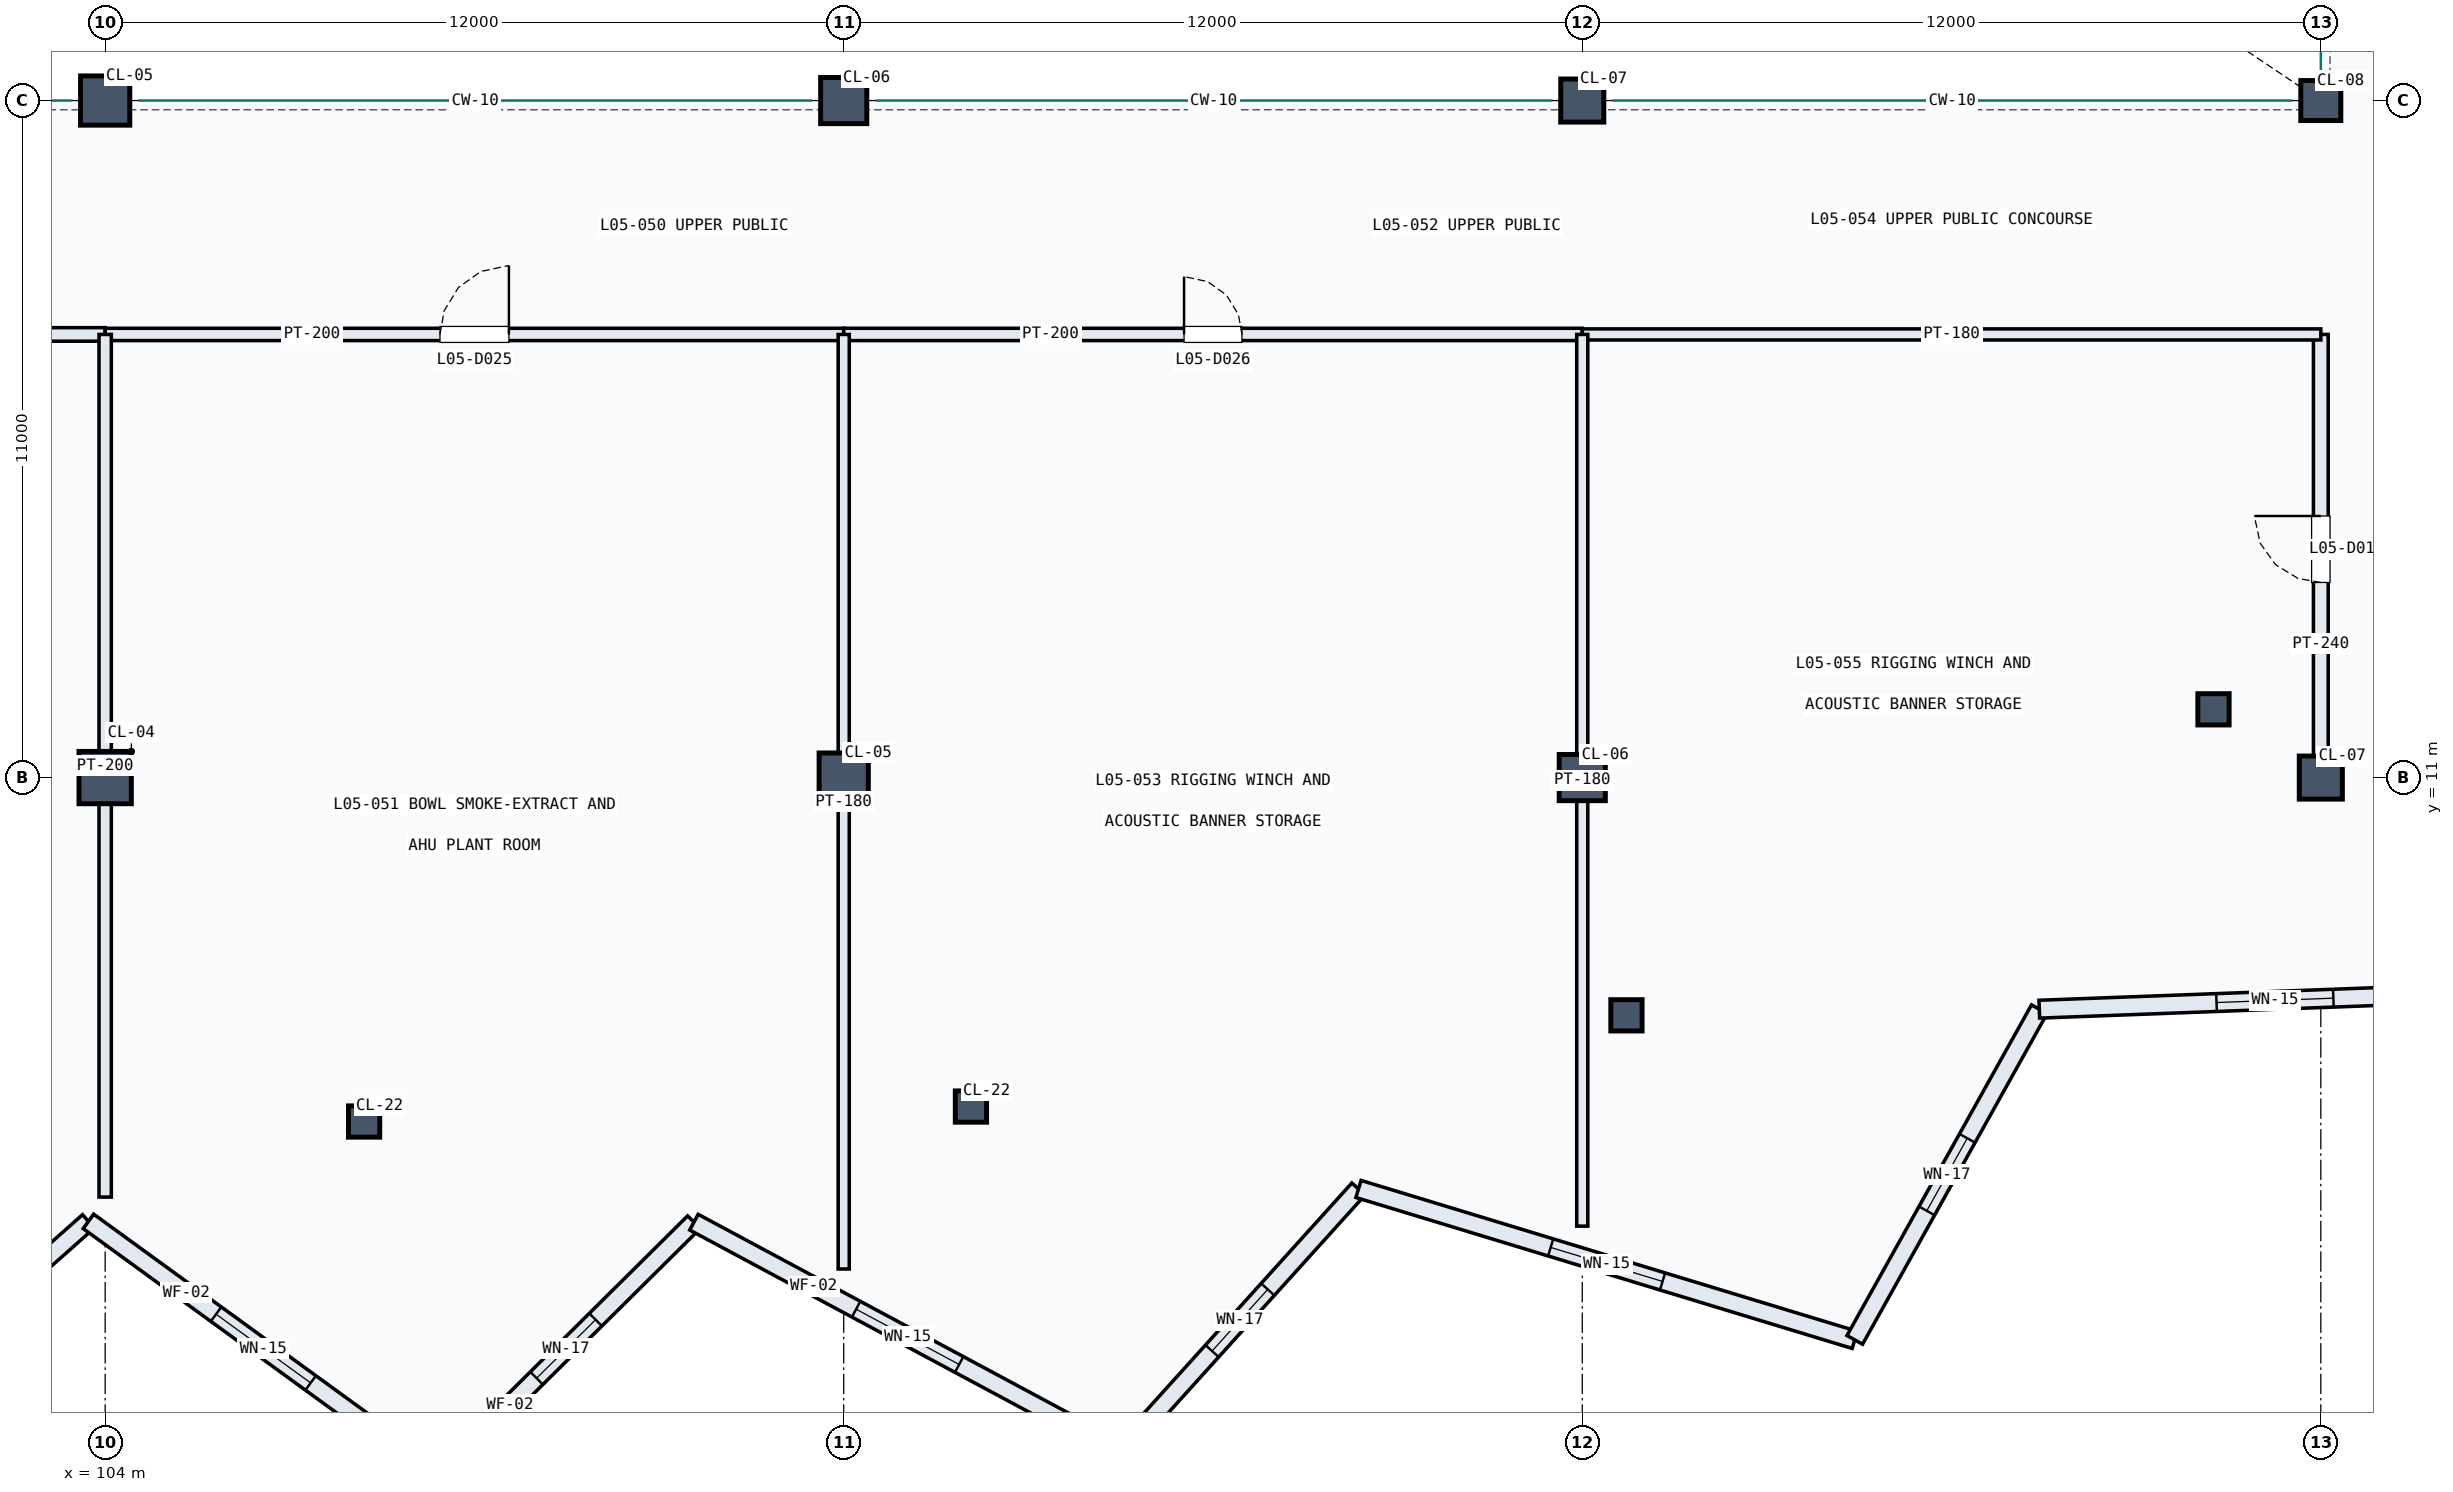
"""IFC4 building model, lengths in metres.
Left out: names, types, materials, properties, quantities, classifications, styles, units other than length and angle.
Written with IfcOpenShell. Run it as: python <this file> out.ifc"""

import sys

from ifc_helpers import new_model, si_unit, direction, frame, frame_2d, origin, origin_2d, place, context, subcontext, project, spatial, rectangle, hollow_circle, extrude, element, fill, save


model = new_model("IFC4")
c1 = context("Model", 3, precision=1e-05, world=origin(), true_north=direction((0.0, 1.0)))
c2 = subcontext(c1, "Body", "Model", "MODEL_VIEW")
j1 = project(units=[si_unit("LENGTHUNIT", "METRE"), si_unit("PLANEANGLEUNIT", "RADIAN")], contexts=[c1])
p1 = place(None, origin())
s1 = spatial("IfcSite", under=j1, at=p1, CompositionType="ELEMENT")
p2 = place(p1, origin())
s2 = spatial("IfcBuilding", under=s1, at=p2, CompositionType="ELEMENT")
p3 = place(p2, frame((0.0, 0.0, 24.3)))
s3 = spatial("IfcBuildingStorey", under=s2, at=p3, CompositionType="ELEMENT", Elevation=24.3)
p4 = place(p3, frame((104.0, 11.0, 0.0), z_axis=(0.0, 0.0, 1.0), x_axis=(1.0, 0.0, 0.0)))
e1 = element("IfcColumn", 1, at=p4, inside=s3, PredefinedType="COLUMN", context=c2, shape_type="SweptSolid", body=[
    extrude(rectangle(XDim=0.85, YDim=0.85, at=origin_2d()), origin(), (0.0, 0.0, 1.0), 5.4),
])
for number, where, z_axis, x_axis in (
    (2, (104.0, 22.0, 0.0), (0.0, 0.0, 1.0), (1.0, 0.0, 0.0)),
    (3, (116.0, 11.0, 0.0), (0.0, 0.0, 1.0), (1.0, 0.0, 0.0)),
):
    element("IfcColumn", number, at=place(p3, frame(where, z_axis=z_axis, x_axis=x_axis)), inside=s3, PredefinedType="COLUMN", context=c2, shape_type="SweptSolid", body=[
        extrude(rectangle(XDim=0.8, YDim=0.8, at=origin_2d()), origin(), (0.0, 0.0, 1.0), 5.4),
    ])
for number, where, z_axis, x_axis in (
    (4, (116.0, 22.0, 0.0), (0.0, 0.0, 1.0), (1.0, 0.0, 0.0)),
    (5, (128.0, 11.0, 0.0), (0.0, 0.0, 1.0), (1.0, 0.0, 0.0)),
):
    element("IfcColumn", number, at=place(p3, frame(where, z_axis=z_axis, x_axis=x_axis)), inside=s3, PredefinedType="COLUMN", context=c2, shape_type="SweptSolid", body=[
        extrude(rectangle(XDim=0.75, YDim=0.75, at=origin_2d()), origin(), (0.0, 0.0, 1.0), 5.4),
    ])
for number, where, z_axis, x_axis in (
    (6, (128.0, 22.0, 0.0), (0.0, 0.0, 1.0), (1.0, 0.0, 0.0)),
    (7, (140.0, 11.0, 0.0), (0.0, 0.0, 1.0), (1.0, 0.0, 0.0)),
):
    element("IfcColumn", number, at=place(p3, frame(where, z_axis=z_axis, x_axis=x_axis)), inside=s3, PredefinedType="COLUMN", context=c2, shape_type="SweptSolid", body=[
        extrude(rectangle(XDim=0.7, YDim=0.7, at=origin_2d()), origin(), (0.0, 0.0, 1.0), 5.4),
    ])
p5 = place(p3, frame((140.0, 22.0, 0.0), z_axis=(0.0, 0.0, 1.0), x_axis=(1.0, 0.0, 0.0)))
e8 = element("IfcColumn", 8, at=p5, inside=s3, PredefinedType="COLUMN", context=c2, shape_type="SweptSolid", body=[
    extrude(rectangle(XDim=0.65, YDim=0.65, at=origin_2d()), origin(), (0.0, 0.0, 1.0), 5.4),
])
for number, where, z_axis, x_axis in (
    (9, (108.207, 5.412, 0.0), (0.0, 0.0, 1.0), (1.0, 0.0, 0.0)),
    (10, (118.067, 5.655, 0.0), (0.0, 0.0, 1.0), (1.0, 0.0, 0.0)),
    (11, (128.718, 7.137, 0.0), (0.0, 0.0, 1.0), (1.0, 0.0, 0.0)),
    (12, (138.256, 12.109, 0.0), (0.0, 0.0, 1.0), (1.0, 0.0, 0.0)),
):
    element("IfcColumn", number, at=place(p3, frame(where, z_axis=z_axis, x_axis=x_axis)), inside=s3, PredefinedType="COLUMN", context=c2, shape_type="SweptSolid", body=[
        extrude(hollow_circle(Radius=0.254, WallThickness=0.02, at=origin_2d()), origin(), (0.0, 0.0, 1.0), 6.05),
    ])
p6 = place(p3, frame((99.0, -0.4, 0.0), z_axis=(0.0, 0.0, 1.0), x_axis=(0.74844895461, 0.663192402205, 0.0)))
e13 = element("IfcWall", 13, at=p6, inside=s3, PredefinedType="USERDEFINED", context=c2, shape_type="SweptSolid", body=[
    extrude(rectangle(XDim=6.317, YDim=0.29, at=frame_2d((3.159, 0.0))), origin(), (0.0, 0.0, 1.0), 4.34),
])
p7 = place(p6, frame((2.484, 0.0, 0.8)))
e14 = element("IfcOpeningElement", 14, at=p7, cuts=e13, PredefinedType="OPENING", context=c2, shape_type="SweptSolid", body=[
    extrude(rectangle(XDim=1.35, YDim=2.1, at=frame_2d((0.675, 1.05))), frame((0.0, 0.155, 0.0), z_axis=(0.0, -1.0, 0.0), x_axis=(1.0, 0.0, 0.0)), (0.0, 0.0, 1.0), 0.31),
])
p8 = place(p3, frame((103.728, 3.79, 0.0), z_axis=(0.0, 0.0, 1.0), x_axis=(0.808841233488, -0.588027090371, 0.0)))
e15 = element("IfcWall", 15, at=p8, inside=s3, PredefinedType="USERDEFINED", context=c2, shape_type="SweptSolid", body=[
    extrude(rectangle(XDim=7.027, YDim=0.29, at=frame_2d((3.514, 0.0))), origin(), (0.0, 0.0, 1.0), 4.34),
])
p9 = place(p8, frame((2.564, 0.0, 0.85)))
e16 = element("IfcOpeningElement", 16, at=p9, cuts=e15, PredefinedType="OPENING", context=c2, shape_type="SweptSolid", body=[
    extrude(rectangle(XDim=1.9, YDim=1.6, at=frame_2d((0.95, 0.8))), frame((0.0, 0.155, 0.0), z_axis=(0.0, -1.0, 0.0), x_axis=(1.0, 0.0, 0.0)), (0.0, 0.0, 1.0), 0.31),
])
p10 = place(p3, frame((109.412, -0.343, 0.0), z_axis=(0.0, 0.0, 1.0), x_axis=(0.710084208502, 0.704116763638, 0.0)))
e17 = element("IfcWall", 17, at=p10, inside=s3, PredefinedType="USERDEFINED", context=c2, shape_type="SweptSolid", body=[
    extrude(rectangle(XDim=5.85, YDim=0.29, at=frame_2d((2.925, 0.0))), origin(), (0.0, 0.0, 1.0), 4.34),
])
p11 = place(p10, frame((2.25, 0.0, 0.8)))
e18 = element("IfcOpeningElement", 18, at=p11, cuts=e17, PredefinedType="OPENING", context=c2, shape_type="SweptSolid", body=[
    extrude(rectangle(XDim=1.35, YDim=2.1, at=frame_2d((0.675, 1.05))), frame((0.0, 0.155, 0.0), z_axis=(0.0, -1.0, 0.0), x_axis=(1.0, 0.0, 0.0)), (0.0, 0.0, 1.0), 0.31),
])
p12 = place(p3, frame((113.566, 3.777, 0.0), z_axis=(0.0, 0.0, 1.0), x_axis=(0.881201188687, -0.472741435731, 0.0)))
e19 = element("IfcWall", 19, at=p12, inside=s3, PredefinedType="USERDEFINED", context=c2, shape_type="SweptSolid", body=[
    extrude(rectangle(XDim=7.881, YDim=0.29, at=frame_2d((3.94, 0.0))), origin(), (0.0, 0.0, 1.0), 4.34),
])
p13 = place(p12, frame((2.99, 0.0, 0.85)))
e20 = element("IfcOpeningElement", 20, at=p13, cuts=e19, PredefinedType="OPENING", context=c2, shape_type="SweptSolid", body=[
    extrude(rectangle(XDim=1.9, YDim=1.6, at=frame_2d((0.95, 0.8))), frame((0.0, 0.155, 0.0), z_axis=(0.0, -1.0, 0.0), x_axis=(1.0, 0.0, 0.0)), (0.0, 0.0, 1.0), 0.31),
])
p14 = place(p3, frame((120.511, 0.051, 0.0), z_axis=(0.0, 0.0, 1.0), x_axis=(0.670348131104, 0.742046752654, 0.0)))
e21 = element("IfcWall", 21, at=p14, inside=s3, PredefinedType="USERDEFINED", context=c2, shape_type="SweptSolid", body=[
    extrude(rectangle(XDim=5.748, YDim=0.29, at=frame_2d((2.874, 0.0))), origin(), (0.0, 0.0, 1.0), 4.34),
])
p15 = place(p14, frame((2.199, 0.0, 0.8)))
e22 = element("IfcOpeningElement", 22, at=p15, cuts=e21, PredefinedType="OPENING", context=c2, shape_type="SweptSolid", body=[
    extrude(rectangle(XDim=1.35, YDim=2.1, at=frame_2d((0.675, 1.05))), frame((0.0, 0.155, 0.0), z_axis=(0.0, -1.0, 0.0), x_axis=(1.0, 0.0, 0.0)), (0.0, 0.0, 1.0), 0.31),
])
p16 = place(p3, frame((124.364, 4.316, 0.0), z_axis=(0.0, 0.0, 1.0), x_axis=(0.956738407321, -0.290949514446, 0.0)))
e23 = element("IfcWall", 23, at=p16, inside=s3, PredefinedType="USERDEFINED", context=c2, shape_type="SweptSolid", body=[
    extrude(rectangle(XDim=8.428, YDim=0.29, at=frame_2d((4.214, 0.0))), origin(), (0.0, 0.0, 1.0), 4.34),
])
p17 = place(p16, frame((3.264, 0.0, 0.85)))
e24 = element("IfcOpeningElement", 24, at=p17, cuts=e23, PredefinedType="OPENING", context=c2, shape_type="SweptSolid", body=[
    extrude(rectangle(XDim=1.9, YDim=1.6, at=frame_2d((0.95, 0.8))), frame((0.0, 0.155, 0.0), z_axis=(0.0, -1.0, 0.0), x_axis=(1.0, 0.0, 0.0)), (0.0, 0.0, 1.0), 0.31),
])
p18 = place(p3, frame((132.427, 1.864, 0.0), z_axis=(0.0, 0.0, 1.0), x_axis=(0.487306352228, 0.87323108, 0.0)))
e25 = element("IfcWall", 25, at=p18, inside=s3, PredefinedType="USERDEFINED", context=c2, shape_type="SweptSolid", body=[
    extrude(rectangle(XDim=6.153, YDim=0.29, at=frame_2d((3.076, 0.0))), origin(), (0.0, 0.0, 1.0), 4.34),
])
p19 = place(p18, frame((2.402, 0.0, 0.8)))
e26 = element("IfcOpeningElement", 26, at=p19, cuts=e25, PredefinedType="OPENING", context=c2, shape_type="SweptSolid", body=[
    extrude(rectangle(XDim=1.35, YDim=2.1, at=frame_2d((0.675, 1.05))), frame((0.0, 0.155, 0.0), z_axis=(0.0, -1.0, 0.0), x_axis=(1.0, 0.0, 0.0)), (0.0, 0.0, 1.0), 0.31),
])
p20 = place(p3, frame((135.426, 7.237, 0.0), z_axis=(0.0, 0.0, 1.0), x_axis=(0.999297884119, 0.037466502319, 0.0)))
e27 = element("IfcWall", 27, at=p20, inside=s3, PredefinedType="USERDEFINED", context=c2, shape_type="SweptSolid", body=[
    extrude(rectangle(XDim=7.663, YDim=0.29, at=frame_2d((3.832, 0.0))), origin(), (0.0, 0.0, 1.0), 4.34),
])
p21 = place(p20, frame((2.882, 0.0, 0.85)))
e28 = element("IfcOpeningElement", 28, at=p21, cuts=e27, PredefinedType="OPENING", context=c2, shape_type="SweptSolid", body=[
    extrude(rectangle(XDim=1.9, YDim=1.6, at=frame_2d((0.95, 0.8))), frame((0.0, 0.155, 0.0), z_axis=(0.0, -1.0, 0.0), x_axis=(1.0, 0.0, 0.0)), (0.0, 0.0, 1.0), 0.31),
])
p22 = place(p3, frame((140.0, 11.22, 0.0), z_axis=(0.0, 0.0, 1.0), x_axis=(0.0, 1.0, 0.0)))
e29 = element("IfcWall", 29, at=p22, inside=s3, PredefinedType="PARTITIONING", context=c2, shape_type="SweptSolid", body=[
    extrude(rectangle(XDim=6.98, YDim=0.24, at=frame_2d((3.49, 0.0))), origin(), (0.0, 0.0, 1.0), 5.18),
])
p23 = place(p22, frame((2.95, 0.0, 0.0)))
e30 = element("IfcOpeningElement", 30, at=p23, cuts=e29, PredefinedType="OPENING", context=c2, shape_type="SweptSolid", body=[
    extrude(rectangle(XDim=1.08, YDim=2.15, at=frame_2d((0.54, 1.075))), frame((0.0, 0.13, 0.0), z_axis=(0.0, -1.0, 0.0), x_axis=(1.0, 0.0, 0.0)), (0.0, 0.0, 1.0), 0.26),
])
p24 = place(p3, frame((94.0, 18.2, 0.0), z_axis=(0.0, 0.0, 1.0), x_axis=(1.0, 0.0, 0.0)))
e31 = element("IfcWall", 31, at=p24, inside=s3, PredefinedType="PARTITIONING", context=c2, shape_type="SweptSolid", body=[
    extrude(rectangle(XDim=10.0, YDim=0.22, at=frame_2d((5.0, 0.0))), origin(), (0.0, 0.0, 1.0), 5.18),
])
p25 = place(p24, frame((3.95, 0.0, 0.0)))
e32 = element("IfcOpeningElement", 32, at=p25, cuts=e31, PredefinedType="OPENING", context=c2, shape_type="SweptSolid", body=[
    extrude(rectangle(XDim=2.1, YDim=2.2, at=frame_2d((1.05, 1.1))), frame((0.0, 0.12, 0.0), z_axis=(0.0, -1.0, 0.0), x_axis=(1.0, 0.0, 0.0)), (0.0, 0.0, 1.0), 0.24),
])
p26 = place(p3, frame((104.0, 18.2, 0.0), z_axis=(0.0, 0.0, 1.0), x_axis=(1.0, 0.0, 0.0)))
e33 = element("IfcWall", 33, at=p26, inside=s3, PredefinedType="PARTITIONING", context=c2, shape_type="SweptSolid", body=[
    extrude(rectangle(XDim=12.0, YDim=0.2, at=frame_2d((6.0, 0.0))), origin(), (0.0, 0.0, 1.0), 5.18),
])
p27 = place(p26, frame((5.44, 0.0, 0.0)))
e34 = element("IfcOpeningElement", 34, at=p27, cuts=e33, PredefinedType="OPENING", context=c2, shape_type="SweptSolid", body=[
    extrude(rectangle(XDim=1.12, YDim=2.25, at=frame_2d((0.56, 1.125))), frame((0.0, 0.11, 0.0), z_axis=(0.0, -1.0, 0.0), x_axis=(1.0, 0.0, 0.0)), (0.0, 0.0, 1.0), 0.22),
])
p28 = place(p3, frame((116.0, 18.2, 0.0), z_axis=(0.0, 0.0, 1.0), x_axis=(1.0, 0.0, 0.0)))
e35 = element("IfcWall", 35, at=p28, inside=s3, PredefinedType="PARTITIONING", context=c2, shape_type="SweptSolid", body=[
    extrude(rectangle(XDim=12.0, YDim=0.2, at=frame_2d((6.0, 0.0))), origin(), (0.0, 0.0, 1.0), 5.18),
])
p29 = place(p28, frame((5.53, 0.0, 0.0)))
e36 = element("IfcOpeningElement", 36, at=p29, cuts=e35, PredefinedType="OPENING", context=c2, shape_type="SweptSolid", body=[
    extrude(rectangle(XDim=0.94, YDim=2.15, at=frame_2d((0.47, 1.075))), frame((0.0, 0.11, 0.0), z_axis=(0.0, -1.0, 0.0), x_axis=(1.0, 0.0, 0.0)), (0.0, 0.0, 1.0), 0.22),
])
p30 = place(p3, frame((128.0, 18.2, 0.0), z_axis=(0.0, 0.0, 1.0), x_axis=(1.0, 0.0, 0.0)))
e37 = element("IfcWall", 37, at=p30, inside=s3, PredefinedType="PARTITIONING", context=c2, shape_type="SweptSolid", body=[
    extrude(rectangle(XDim=12.0, YDim=0.18, at=frame_2d((6.0, 0.0))), origin(), (0.0, 0.0, 1.0), 5.18),
])
p31 = place(p3, frame((104.0, 4.185, 0.0), z_axis=(0.0, 0.0, 1.0), x_axis=(0.0, 1.0, 0.0)))
e38 = element("IfcWall", 38, at=p31, inside=s3, PredefinedType="PARTITIONING", context=c2, shape_type="SweptSolid", body=[
    extrude(rectangle(XDim=14.015, YDim=0.2, at=frame_2d((7.008, 0.0))), origin(), (0.0, 0.0, 1.0), 5.18),
])
p32 = place(p3, frame((116.0, 3.016, 0.0), z_axis=(0.0, 0.0, 1.0), x_axis=(0.0, 1.0, 0.0)))
e39 = element("IfcWall", 39, at=p32, inside=s3, PredefinedType="PARTITIONING", context=c2, shape_type="SweptSolid", body=[
    extrude(rectangle(XDim=15.184, YDim=0.18, at=frame_2d((7.592, 0.0))), origin(), (0.0, 0.0, 1.0), 5.18),
])
p33 = place(p3, frame((128.0, 3.712, 0.0), z_axis=(0.0, 0.0, 1.0), x_axis=(0.0, 1.0, 0.0)))
e40 = element("IfcWall", 40, at=p33, inside=s3, PredefinedType="PARTITIONING", context=c2, shape_type="SweptSolid", body=[
    extrude(rectangle(XDim=14.488, YDim=0.18, at=frame_2d((7.244, 0.0))), origin(), (0.0, 0.0, 1.0), 5.18),
])
p34 = place(p9, origin())
e41 = element("IfcWindow", 41, at=p34, inside=s3, PartitioningType="SINGLE_PANEL", PredefinedType="WINDOW", context=c2, shape_type="SweptSolid", body=[
    extrude(rectangle(XDim=1.9, YDim=1.6, at=frame_2d((0.95, 0.8))), frame((0.0, 0.03, 0.0), z_axis=(0.0, -1.0, 0.0), x_axis=(1.0, 0.0, 0.0)), (0.0, 0.0, 1.0), 0.06),
])
fill(e16, e41)
p35 = place(p11, origin())
e42 = element("IfcWindow", 42, at=p35, inside=s3, PartitioningType="SINGLE_PANEL", PredefinedType="WINDOW", context=c2, shape_type="SweptSolid", body=[
    extrude(rectangle(XDim=1.35, YDim=2.1, at=frame_2d((0.675, 1.05))), frame((0.0, 0.03, 0.0), z_axis=(0.0, -1.0, 0.0), x_axis=(1.0, 0.0, 0.0)), (0.0, 0.0, 1.0), 0.06),
])
fill(e18, e42)
p36 = place(p13, origin())
e43 = element("IfcWindow", 43, at=p36, inside=s3, PartitioningType="SINGLE_PANEL", PredefinedType="WINDOW", context=c2, shape_type="SweptSolid", body=[
    extrude(rectangle(XDim=1.9, YDim=1.6, at=frame_2d((0.95, 0.8))), frame((0.0, 0.03, 0.0), z_axis=(0.0, -1.0, 0.0), x_axis=(1.0, 0.0, 0.0)), (0.0, 0.0, 1.0), 0.06),
])
fill(e20, e43)
p37 = place(p15, origin())
e44 = element("IfcWindow", 44, at=p37, inside=s3, PartitioningType="SINGLE_PANEL", PredefinedType="WINDOW", context=c2, shape_type="SweptSolid", body=[
    extrude(rectangle(XDim=1.35, YDim=2.1, at=frame_2d((0.675, 1.05))), frame((0.0, 0.03, 0.0), z_axis=(0.0, -1.0, 0.0), x_axis=(1.0, 0.0, 0.0)), (0.0, 0.0, 1.0), 0.06),
])
fill(e22, e44)
p38 = place(p17, origin())
e45 = element("IfcWindow", 45, at=p38, inside=s3, PartitioningType="SINGLE_PANEL", PredefinedType="WINDOW", context=c2, shape_type="SweptSolid", body=[
    extrude(rectangle(XDim=1.9, YDim=1.6, at=frame_2d((0.95, 0.8))), frame((0.0, 0.03, 0.0), z_axis=(0.0, -1.0, 0.0), x_axis=(1.0, 0.0, 0.0)), (0.0, 0.0, 1.0), 0.06),
])
fill(e24, e45)
p39 = place(p19, origin())
e46 = element("IfcWindow", 46, at=p39, inside=s3, PartitioningType="SINGLE_PANEL", PredefinedType="WINDOW", context=c2, shape_type="SweptSolid", body=[
    extrude(rectangle(XDim=1.35, YDim=2.1, at=frame_2d((0.675, 1.05))), frame((0.0, 0.03, 0.0), z_axis=(0.0, -1.0, 0.0), x_axis=(1.0, 0.0, 0.0)), (0.0, 0.0, 1.0), 0.06),
])
fill(e26, e46)
p40 = place(p21, origin())
e47 = element("IfcWindow", 47, at=p40, inside=s3, PartitioningType="SINGLE_PANEL", PredefinedType="WINDOW", context=c2, shape_type="SweptSolid", body=[
    extrude(rectangle(XDim=1.9, YDim=1.6, at=frame_2d((0.95, 0.8))), frame((0.0, 0.03, 0.0), z_axis=(0.0, -1.0, 0.0), x_axis=(1.0, 0.0, 0.0)), (0.0, 0.0, 1.0), 0.06),
])
fill(e28, e47)
p41 = place(p23, origin())
e48 = element("IfcDoor", 48, at=p41, inside=s3, OperationType="SINGLE_SWING_RIGHT", PredefinedType="DOOR", context=c2, shape_type="SweptSolid", body=[
    extrude(rectangle(XDim=1.08, YDim=2.15, at=frame_2d((0.54, 1.075))), frame((0.0, 0.025, 0.0), z_axis=(0.0, -1.0, 0.0), x_axis=(1.0, 0.0, 0.0)), (0.0, 0.0, 1.0), 0.05),
])
fill(e30, e48)
p42 = place(p27, origin())
e49 = element("IfcDoor", 49, at=p42, inside=s3, OperationType="SINGLE_SWING_RIGHT", PredefinedType="DOOR", context=c2, shape_type="SweptSolid", body=[
    extrude(rectangle(XDim=1.12, YDim=2.25, at=frame_2d((0.56, 1.125))), frame((0.0, 0.025, 0.0), z_axis=(0.0, -1.0, 0.0), x_axis=(1.0, 0.0, 0.0)), (0.0, 0.0, 1.0), 0.05),
])
fill(e34, e49)
p43 = place(p29, origin())
e50 = element("IfcDoor", 50, at=p43, inside=s3, OperationType="SINGLE_SWING_LEFT", PredefinedType="DOOR", context=c2, shape_type="SweptSolid", body=[
    extrude(rectangle(XDim=0.94, YDim=2.15, at=frame_2d((0.47, 1.075))), frame((0.0, 0.025, 0.0), z_axis=(0.0, -1.0, 0.0), x_axis=(1.0, 0.0, 0.0)), (0.0, 0.0, 1.0), 0.05),
])
fill(e36, e50)
save(model, sys.argv[1])
